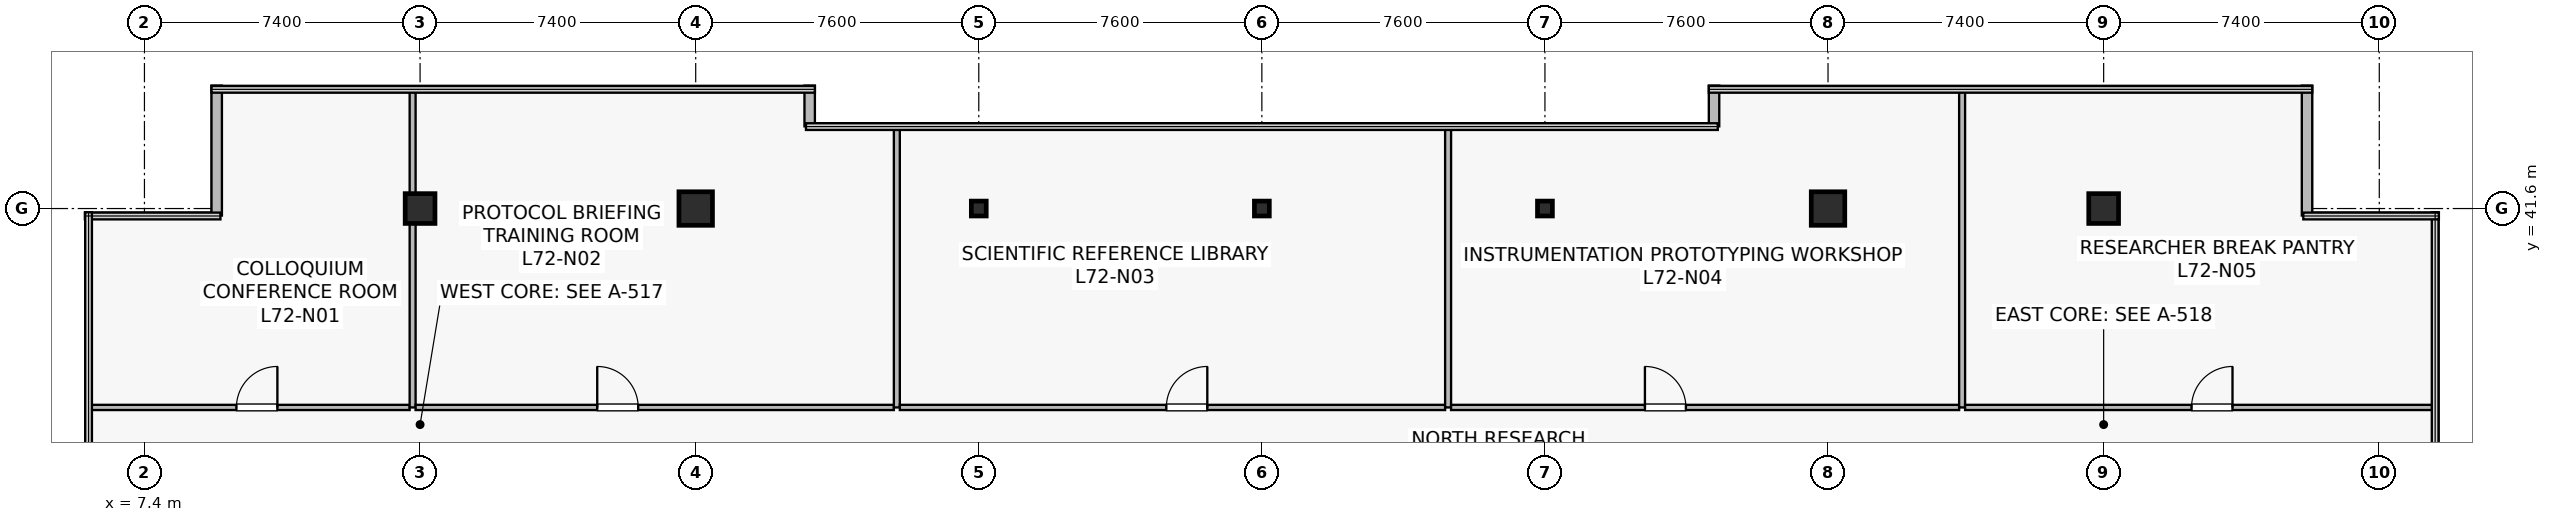
"""IFC4 building model, lengths in metres.
Left out: names, types, materials, properties, quantities, classifications, styles, units other than length and angle.
Written with IfcOpenShell. Run it as: python <this file> out.ifc"""

import sys

from ifc_helpers import new_model, si_unit, direction, frame, frame_2d, origin, origin_2d, place, context, subcontext, project, spatial, rectangle, i_section, extrude, source, transform, mapped, element, fill, save


model = new_model("IFC4")
c1 = context("Model", 3, precision=1e-05, world=origin(), true_north=direction((0.0, 1.0)))
c2 = subcontext(c1, "Body", "Model", "MODEL_VIEW")
j1 = project(units=[si_unit("LENGTHUNIT", "METRE"), si_unit("PLANEANGLEUNIT", "RADIAN")], contexts=[c1])
p1 = place(None, origin())
s1 = spatial("IfcSite", under=j1, at=p1, CompositionType="ELEMENT")
p2 = place(p1, origin())
s2 = spatial("IfcBuilding", under=s1, at=p2, CompositionType="ELEMENT")
p3 = place(p2, frame((0.0, 0.0, 301.8)))
s3 = spatial("IfcBuildingStorey", under=s2, at=p3, CompositionType="ELEMENT", Elevation=301.8)
m1 = source(origin(), c2, "Body", "SweptSolid", [
    extrude(rectangle(XDim=0.8, YDim=0.8, at=origin_2d()), origin(), (0.0, 0.0, 1.0), 4.2),
])
p4 = place(p3, frame((14.8, 41.6, 0.0), z_axis=(0.0, 0.0, 1.0), x_axis=(1.0, 0.0, 0.0)))
e1 = element("IfcColumn", 1, at=p4, inside=s3, PredefinedType="COLUMN", context=c2, shape_type="MappedRepresentation", body=[
    mapped(m1, transform((0.0, 0.0, 0.0), scale=1.0)),
])
m2 = source(origin(), c2, "Body", "SweptSolid", [
    extrude(rectangle(XDim=0.9, YDim=0.9, at=origin_2d()), origin(), (0.0, 0.0, 1.0), 4.2),
])
for number, where, z_axis, x_axis in (
    (2, (22.2, 41.6, 0.0), (0.0, 0.0, 1.0), (1.0, 0.0, 0.0)),
    (3, (52.6, 41.6, 0.0), (0.0, 0.0, 1.0), (1.0, 0.0, 0.0)),
):
    element("IfcColumn", number, at=place(p3, frame(where, z_axis=z_axis, x_axis=x_axis)), inside=s3, PredefinedType="COLUMN", context=c2, shape_type="MappedRepresentation", body=[
        mapped(m2, transform((0.0, 0.0, 0.0), scale=1.0)),
    ])
p5 = place(p3, frame((60.0, 41.6, 0.0), z_axis=(0.0, 0.0, 1.0), x_axis=(1.0, 0.0, 0.0)))
e4 = element("IfcColumn", 4, at=p5, inside=s3, PredefinedType="COLUMN", context=c2, shape_type="MappedRepresentation", body=[
    mapped(m1, transform((0.0, 0.0, 0.0), scale=1.0)),
])
m3 = source(origin(), c2, "Body", "SweptSolid", [
    extrude(i_section(OverallWidth=0.4, OverallDepth=0.4, WebThickness=0.021, FlangeThickness=0.021, at=origin_2d()), origin(), (0.0, 0.0, 1.0), 4.2),
])
for number, where, z_axis, x_axis in (
    (5, (29.8, 41.6, 0.0), (0.0, 0.0, 1.0), (1.0, 0.0, 0.0)),
    (6, (37.4, 41.6, 0.0), (0.0, 0.0, 1.0), (1.0, 0.0, 0.0)),
    (7, (45.0, 41.6, 0.0), (0.0, 0.0, 1.0), (1.0, 0.0, 0.0)),
):
    element("IfcColumn", number, at=place(p3, frame(where, z_axis=z_axis, x_axis=x_axis)), inside=s3, PredefinedType="COLUMN", context=c2, shape_type="MappedRepresentation", body=[
        mapped(m3, transform((0.0, 0.0, 0.0), scale=1.0)),
    ])
p6 = place(p3, frame((65.46, 41.412, 0.0), z_axis=(0.0, 0.0, 1.0), x_axis=(0.0, 1.0, 0.0)))
e8 = element("IfcWall", 8, at=p6, inside=s3, PredefinedType="STANDARD", context=c2, shape_type="SweptSolid", body=[
    extrude(rectangle(XDim=3.488, YDim=0.28, at=frame_2d((1.744, 0.0))), origin(), (0.0, 0.0, 1.0), 3.9),
])
for number, where, z_axis, x_axis in (
    (9, (49.54, 44.9, 0.0), (0.0, 0.0, 1.0), (0.0, -1.0, 0.0)),
    (10, (25.26, 43.807, 0.0), (0.0, 0.0, 1.0), (0.0, 1.0, 0.0)),
):
    element("IfcWall", number, at=place(p3, frame(where, z_axis=z_axis, x_axis=x_axis)), inside=s3, PredefinedType="STANDARD", context=c2, shape_type="SweptSolid", body=[
        extrude(rectangle(XDim=1.093, YDim=0.28, at=frame_2d((0.546, 0.0))), origin(), (0.0, 0.0, 1.0), 3.9),
    ])
p7 = place(p3, frame((9.34, 44.9, 0.0), z_axis=(0.0, 0.0, 1.0), x_axis=(0.0, -1.0, 0.0)))
e11 = element("IfcWall", 11, at=p7, inside=s3, PredefinedType="STANDARD", context=c2, shape_type="SweptSolid", body=[
    extrude(rectangle(XDim=3.488, YDim=0.28, at=frame_2d((1.744, 0.0))), origin(), (0.0, 0.0, 1.0), 3.9),
])
p8 = place(p3, frame((5.91, 36.26, 0.0), z_axis=(0.0, 0.0, 1.0), x_axis=(1.0, 0.0, 0.0)))
e12 = element("IfcWall", 12, at=p8, inside=s3, PredefinedType="PARTITIONING", context=c2, shape_type="SweptSolid", body=[
    extrude(rectangle(XDim=8.61, YDim=0.14, at=frame_2d((4.305, 0.0))), origin(), (0.0, 0.0, 1.0), 3.9),
])
p9 = place(p8, frame((3.959, 0.0, 0.0)))
e13 = element("IfcOpeningElement", 13, at=p9, cuts=e12, PredefinedType="OPENING", context=c2, shape_type="SweptSolid", body=[
    extrude(rectangle(XDim=1.1, YDim=2.18, at=frame_2d((0.55, 1.09))), frame((0.0, 0.08, 0.0), z_axis=(0.0, -1.0, 0.0), x_axis=(1.0, 0.0, 0.0)), (0.0, 0.0, 1.0), 0.16),
])
p10 = place(p3, frame((14.6, 36.26, 0.0), z_axis=(0.0, 0.0, 1.0), x_axis=(0.0, 1.0, 0.0)))
e14 = element("IfcWall", 14, at=p10, inside=s3, PredefinedType="PARTITIONING", context=c2, shape_type="SweptSolid", body=[
    extrude(rectangle(XDim=8.53, YDim=0.16, at=frame_2d((4.265, 0.0))), origin(), (0.0, 0.0, 1.0), 3.297),
])
p11 = place(p3, frame((14.68, 36.26, 0.0), z_axis=(0.0, 0.0, 1.0), x_axis=(1.0, 0.0, 0.0)))
e15 = element("IfcWall", 15, at=p11, inside=s3, PredefinedType="PARTITIONING", context=c2, shape_type="SweptSolid", body=[
    extrude(rectangle(XDim=12.84, YDim=0.14, at=frame_2d((6.42, 0.0))), origin(), (0.0, 0.0, 1.0), 3.297),
])
p12 = place(p11, frame((4.876, 0.0, 0.0)))
e16 = element("IfcOpeningElement", 16, at=p12, cuts=e15, PredefinedType="OPENING", context=c2, shape_type="SweptSolid", body=[
    extrude(rectangle(XDim=1.1, YDim=2.18, at=frame_2d((0.55, 1.09))), frame((0.0, 0.08, 0.0), z_axis=(0.0, -1.0, 0.0), x_axis=(1.0, 0.0, 0.0)), (0.0, 0.0, 1.0), 0.16),
])
p13 = place(p3, frame((27.6, 36.26, 0.0), z_axis=(0.0, 0.0, 1.0), x_axis=(0.0, 1.0, 0.0)))
e17 = element("IfcWall", 17, at=p13, inside=s3, PredefinedType="PARTITIONING", context=c2, shape_type="SweptSolid", body=[
    extrude(rectangle(XDim=7.53, YDim=0.16, at=frame_2d((3.765, 0.0))), origin(), (0.0, 0.0, 1.0), 2.985),
])
p14 = place(p3, frame((27.68, 36.26, 0.0), z_axis=(0.0, 0.0, 1.0), x_axis=(1.0, 0.0, 0.0)))
e18 = element("IfcWall", 18, at=p14, inside=s3, PredefinedType="PARTITIONING", context=c2, shape_type="SweptSolid", body=[
    extrude(rectangle(XDim=14.64, YDim=0.14, at=frame_2d((7.32, 0.0))), origin(), (0.0, 0.0, 1.0), 3.297),
])
p15 = place(p14, frame((7.155, 0.0, 0.0)))
e19 = element("IfcOpeningElement", 19, at=p15, cuts=e18, PredefinedType="OPENING", context=c2, shape_type="SweptSolid", body=[
    extrude(rectangle(XDim=1.1, YDim=2.18, at=frame_2d((0.55, 1.09))), frame((0.0, 0.08, 0.0), z_axis=(0.0, -1.0, 0.0), x_axis=(1.0, 0.0, 0.0)), (0.0, 0.0, 1.0), 0.16),
])
p16 = place(p3, frame((42.4, 36.26, 0.0), z_axis=(0.0, 0.0, 1.0), x_axis=(0.0, 1.0, 0.0)))
e20 = element("IfcWall", 20, at=p16, inside=s3, PredefinedType="PARTITIONING", context=c2, shape_type="SweptSolid", body=[
    extrude(rectangle(XDim=7.53, YDim=0.16, at=frame_2d((3.765, 0.0))), origin(), (0.0, 0.0, 1.0), 2.985),
])
p17 = place(p3, frame((42.48, 36.26, 0.0), z_axis=(0.0, 0.0, 1.0), x_axis=(1.0, 0.0, 0.0)))
e21 = element("IfcWall", 21, at=p17, inside=s3, PredefinedType="PARTITIONING", context=c2, shape_type="SweptSolid", body=[
    extrude(rectangle(XDim=13.64, YDim=0.14, at=frame_2d((6.82, 0.0))), origin(), (0.0, 0.0, 1.0), 3.297),
])
p18 = place(p17, frame((5.204, 0.0, 0.0)))
e22 = element("IfcOpeningElement", 22, at=p18, cuts=e21, PredefinedType="OPENING", context=c2, shape_type="SweptSolid", body=[
    extrude(rectangle(XDim=1.1, YDim=2.18, at=frame_2d((0.55, 1.09))), frame((0.0, 0.08, 0.0), z_axis=(0.0, -1.0, 0.0), x_axis=(1.0, 0.0, 0.0)), (0.0, 0.0, 1.0), 0.16),
])
p19 = place(p3, frame((56.2, 36.26, 0.0), z_axis=(0.0, 0.0, 1.0), x_axis=(0.0, 1.0, 0.0)))
e23 = element("IfcWall", 23, at=p19, inside=s3, PredefinedType="PARTITIONING", context=c2, shape_type="SweptSolid", body=[
    extrude(rectangle(XDim=8.53, YDim=0.16, at=frame_2d((4.265, 0.0))), origin(), (0.0, 0.0, 1.0), 3.235),
])
p20 = place(p3, frame((56.28, 36.26, 0.0), z_axis=(0.0, 0.0, 1.0), x_axis=(1.0, 0.0, 0.0)))
e24 = element("IfcWall", 24, at=p20, inside=s3, PredefinedType="PARTITIONING", context=c2, shape_type="SweptSolid", body=[
    extrude(rectangle(XDim=12.61, YDim=0.14, at=frame_2d((6.305, 0.0))), origin(), (0.0, 0.0, 1.0), 3.297),
])
p21 = place(p20, frame((6.079, 0.0, 0.0)))
e25 = element("IfcOpeningElement", 25, at=p21, cuts=e24, PredefinedType="OPENING", context=c2, shape_type="SweptSolid", body=[
    extrude(rectangle(XDim=1.1, YDim=2.18, at=frame_2d((0.55, 1.09))), frame((0.0, 0.08, 0.0), z_axis=(0.0, -1.0, 0.0), x_axis=(1.0, 0.0, 0.0)), (0.0, 0.0, 1.0), 0.16),
])
m4 = source(origin(), c2, "Body", "SweptSolid", [
    extrude(rectangle(XDim=1.1, YDim=2.18, at=frame_2d((0.55, 1.09))), frame((0.0, 0.025, 0.0), z_axis=(0.0, -1.0, 0.0), x_axis=(1.0, 0.0, 0.0)), (0.0, 0.0, 1.0), 0.05),
])
p22 = place(p9, origin())
e26 = element("IfcDoor", 26, at=p22, inside=s3, OperationType="SINGLE_SWING_RIGHT", PredefinedType="DOOR", context=c2, shape_type="MappedRepresentation", body=[
    mapped(m4, transform((0.0, 0.0, 0.0), scale=1.0)),
])
fill(e13, e26)
p23 = place(p12, origin())
e27 = element("IfcDoor", 27, at=p23, inside=s3, OperationType="SINGLE_SWING_LEFT", PredefinedType="DOOR", context=c2, shape_type="MappedRepresentation", body=[
    mapped(m4, transform((0.0, 0.0, 0.0), scale=1.0)),
])
fill(e16, e27)
p24 = place(p15, origin())
e28 = element("IfcDoor", 28, at=p24, inside=s3, OperationType="SINGLE_SWING_RIGHT", PredefinedType="DOOR", context=c2, shape_type="MappedRepresentation", body=[
    mapped(m4, transform((0.0, 0.0, 0.0), scale=1.0)),
])
fill(e19, e28)
p25 = place(p18, origin())
e29 = element("IfcDoor", 29, at=p25, inside=s3, OperationType="SINGLE_SWING_LEFT", PredefinedType="DOOR", context=c2, shape_type="MappedRepresentation", body=[
    mapped(m4, transform((0.0, 0.0, 0.0), scale=1.0)),
])
fill(e22, e29)
p26 = place(p21, origin())
e30 = element("IfcDoor", 30, at=p26, inside=s3, OperationType="SINGLE_SWING_RIGHT", PredefinedType="DOOR", context=c2, shape_type="MappedRepresentation", body=[
    mapped(m4, transform((0.0, 0.0, 0.0), scale=1.0)),
])
fill(e25, e30)
save(model, sys.argv[1])
